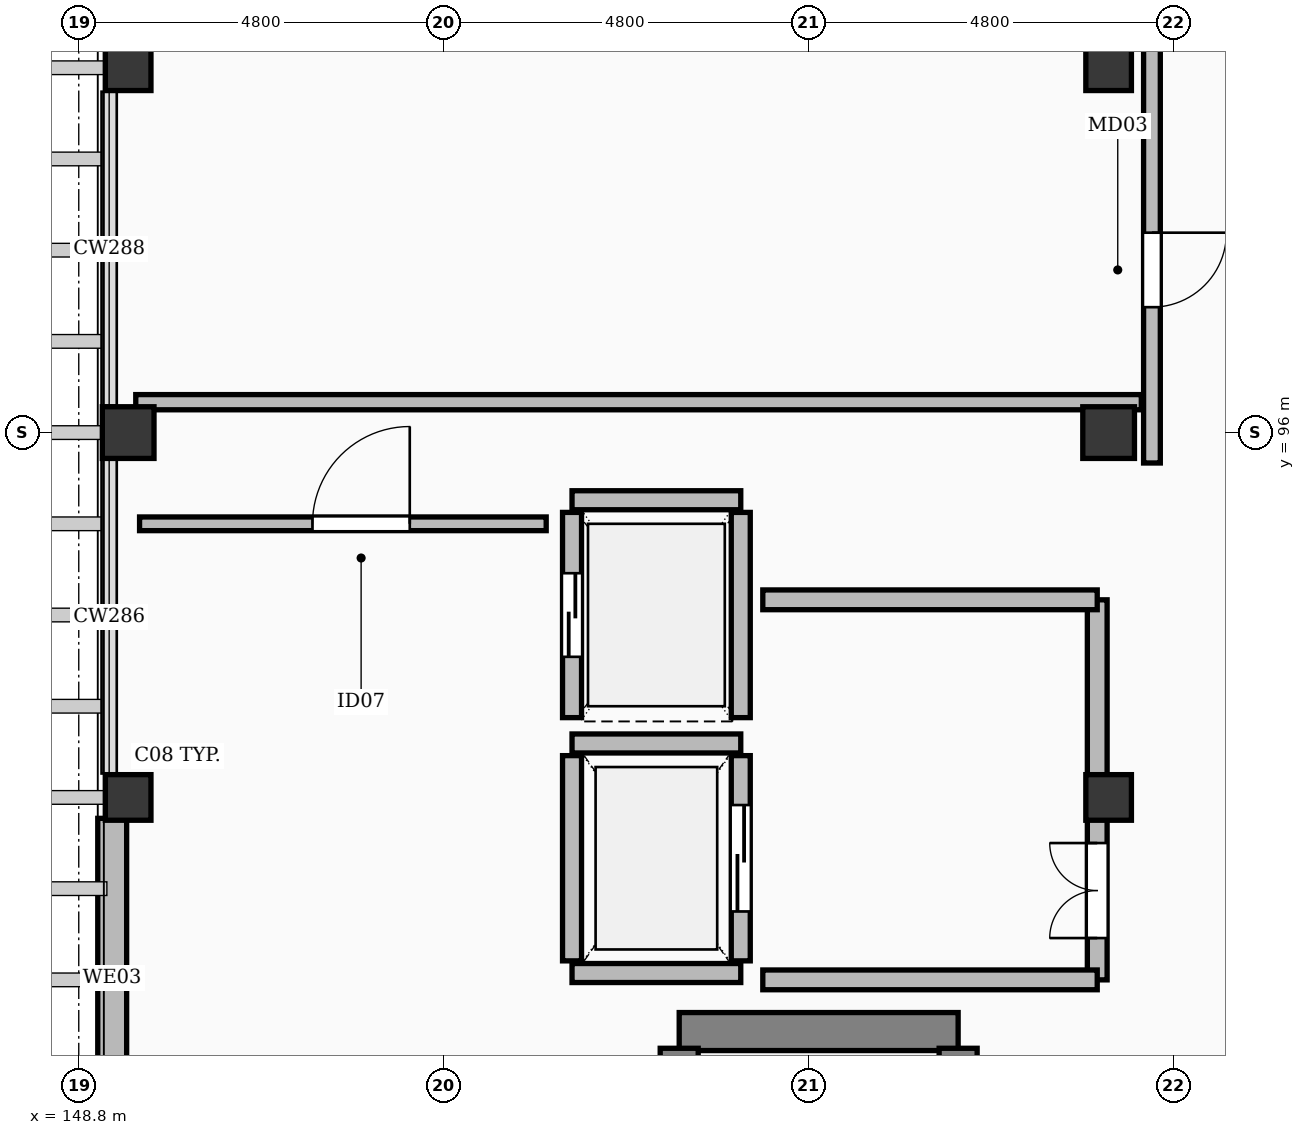
"""IFC4 building model, lengths in metres.
Left out: names, types, materials, properties, quantities, classifications, styles, units other than length and angle.
Written with IfcOpenShell. Run it as: python <this file> out.ifc"""

import sys

from ifc_helpers import new_model, si_unit, direction, frame, frame_2d, origin, origin_2d, place, context, subcontext, project, spatial, rectangle, extrude, element, fill, save


model = new_model("IFC4")
c1 = context("Model", 3, precision=1e-05, world=origin(), true_north=direction((0.0, 1.0)))
c2 = subcontext(c1, "Body", "Model", "MODEL_VIEW")
j1 = project(units=[si_unit("LENGTHUNIT", "METRE"), si_unit("PLANEANGLEUNIT", "RADIAN")], contexts=[c1])
p1 = place(None, origin())
s1 = spatial("IfcSite", under=j1, at=p1, CompositionType="ELEMENT")
p2 = place(p1, origin())
s2 = spatial("IfcBuilding", under=s1, at=p2, CompositionType="ELEMENT")
p3 = place(p2, frame((0.0, 0.0, 35.4)))
s3 = spatial("IfcBuildingStorey", under=s2, at=p3, CompositionType="ELEMENT", Elevation=35.4)
for number, where, z_axis, x_axis in (
    (1, (149.45, 96.0, 0.0), (0.0, 0.0, 1.0), (1.0, 0.0, 0.0)),
    (2, (162.35, 96.0, 0.0), (0.0, 0.0, 1.0), (1.0, 0.0, 0.0)),
):
    element("IfcColumn", number, at=place(p3, frame(where, z_axis=z_axis, x_axis=x_axis)), inside=s3, PredefinedType="COLUMN", context=c2, shape_type="SweptSolid", body=[
        extrude(rectangle(XDim=0.68, YDim=0.68, at=origin_2d()), origin(), (0.0, 0.0, 1.0), 3.6),
    ])
for number, where, z_axis, x_axis in (
    (3, (149.45, 91.2, 0.0), (0.0, 0.0, 1.0), (1.0, 0.0, 0.0)),
    (4, (149.45, 100.8, 0.0), (0.0, 0.0, 1.0), (1.0, 0.0, 0.0)),
    (5, (162.35, 91.2, 0.0), (0.0, 0.0, 1.0), (1.0, 0.0, 0.0)),
    (6, (162.35, 100.8, 0.0), (0.0, 0.0, 1.0), (1.0, 0.0, 0.0)),
):
    element("IfcColumn", number, at=place(p3, frame(where, z_axis=z_axis, x_axis=x_axis)), inside=s3, PredefinedType="COLUMN", context=c2, shape_type="SweptSolid", body=[
        extrude(rectangle(XDim=0.6, YDim=0.6, at=origin_2d()), origin(), (0.0, 0.0, 1.0), 3.6),
    ])
p4 = place(p3, frame((149.24, 86.715, 0.0), z_axis=(0.0, 0.0, 1.0), x_axis=(0.0, 1.0, 0.0)))
e7 = element("IfcWall", 7, at=p4, inside=s3, PredefinedType="SOLIDWALL", context=c2, shape_type="SweptSolid", body=[
    extrude(rectangle(XDim=4.21, YDim=0.38, at=frame_2d((2.105, 0.0))), origin(), (0.0, 0.0, 1.0), 2.732),
])
p5 = place(p3, frame((156.7, 88.12, 0.0), z_axis=(0.0, 0.0, 1.0), x_axis=(1.0, 0.0, 0.0)))
e8 = element("IfcWall", 8, at=p5, inside=s3, PredefinedType="SHEAR", context=c2, shape_type="SweptSolid", body=[
    extrude(rectangle(XDim=3.67, YDim=0.5, at=frame_2d((1.835, 0.0))), origin(), (0.0, 0.0, 1.0), 3.36),
])
p6 = place(p3, frame((156.7, 77.4, 0.0), z_axis=(0.0, 0.0, 1.0), x_axis=(0.0, 1.0, 0.0)))
e9 = element("IfcWall", 9, at=p6, inside=s3, PredefinedType="SHEAR", context=c2, shape_type="SweptSolid", body=[
    extrude(rectangle(XDim=10.5, YDim=0.5, at=frame_2d((5.25, 0.0))), origin(), (0.0, 0.0, 1.0), 3.36),
])
p7 = place(p3, frame((160.37, 77.4, 0.0), z_axis=(0.0, 0.0, 1.0), x_axis=(0.0, 1.0, 0.0)))
e10 = element("IfcWall", 10, at=p7, inside=s3, PredefinedType="SHEAR", context=c2, shape_type="SweptSolid", body=[
    extrude(rectangle(XDim=10.5, YDim=0.5, at=frame_2d((5.25, 0.0))), origin(), (0.0, 0.0, 1.0), 3.36),
])
p8 = place(p7, frame((0.45, 0.0, 0.0)))
e11 = element("IfcOpeningElement", 11, at=p8, cuts=e10, PredefinedType="OPENING", context=c2, shape_type="SweptSolid", body=[
    extrude(rectangle(XDim=1.3, YDim=2.15, at=frame_2d((0.65, 1.075))), frame((0.0, 0.262, 0.0), z_axis=(0.0, -1.0, 0.0), x_axis=(1.0, 0.0, 0.0)), (0.0, 0.0, 1.0), 0.524),
])
for number, where, z_axis, x_axis in (
    (12, (155.29, 88.89, 0.0), (0.0, 0.0, 1.0), (1.0, 0.0, 0.0)),
    (13, (155.29, 91.91, 0.0), (0.0, 0.0, 1.0), (1.0, 0.0, 0.0)),
):
    element("IfcWall", number, at=place(p3, frame(where, z_axis=z_axis, x_axis=x_axis)), inside=s3, PredefinedType="SOLIDWALL", context=c2, shape_type="SweptSolid", body=[
        extrude(rectangle(XDim=2.22, YDim=0.25, at=frame_2d((1.11, 0.0))), origin(), (0.0, 0.0, 1.0), 3.36),
    ])
p9 = place(p3, frame((155.29, 89.05, 0.0), z_axis=(0.0, 0.0, 1.0), x_axis=(0.0, 1.0, 0.0)))
e14 = element("IfcWall", 14, at=p9, inside=s3, PredefinedType="SOLIDWALL", context=c2, shape_type="SweptSolid", body=[
    extrude(rectangle(XDim=2.7, YDim=0.25, at=frame_2d((1.35, 0.0))), origin(), (0.0, 0.0, 1.0), 2.732),
])
p10 = place(p3, frame((157.51, 89.05, 0.0), z_axis=(0.0, 0.0, 1.0), x_axis=(0.0, 1.0, 0.0)))
e15 = element("IfcWall", 15, at=p10, inside=s3, PredefinedType="SOLIDWALL", context=c2, shape_type="SweptSolid", body=[
    extrude(rectangle(XDim=2.7, YDim=0.25, at=frame_2d((1.35, 0.0))), origin(), (0.0, 0.0, 1.0), 2.732),
])
p11 = place(p10, frame((0.65, 0.0, 0.0)))
e16 = element("IfcOpeningElement", 16, at=p11, cuts=e15, PredefinedType="OPENING", context=c2, shape_type="SweptSolid", body=[
    extrude(rectangle(XDim=1.4, YDim=2.3, at=frame_2d((0.7, 1.15))), frame((0.0, 0.137, 0.0), z_axis=(0.0, -1.0, 0.0), x_axis=(1.0, 0.0, 0.0)), (0.0, 0.0, 1.0), 0.274),
])
p12 = place(p3, frame((155.29, 95.11, 0.0), z_axis=(0.0, 0.0, 1.0), x_axis=(1.0, 0.0, 0.0)))
e17 = element("IfcWall", 17, at=p12, inside=s3, PredefinedType="SOLIDWALL", context=c2, shape_type="SweptSolid", body=[
    extrude(rectangle(XDim=2.22, YDim=0.25, at=frame_2d((1.11, 0.0))), origin(), (0.0, 0.0, 1.0), 3.36),
])
p13 = place(p3, frame((155.29, 92.25, 0.0), z_axis=(0.0, 0.0, 1.0), x_axis=(0.0, 1.0, 0.0)))
e18 = element("IfcWall", 18, at=p13, inside=s3, PredefinedType="SOLIDWALL", context=c2, shape_type="SweptSolid", body=[
    extrude(rectangle(XDim=2.7, YDim=0.25, at=frame_2d((1.35, 0.0))), origin(), (0.0, 0.0, 1.0), 3.36),
])
p14 = place(p13, frame((0.8, 0.0, 0.0)))
e19 = element("IfcOpeningElement", 19, at=p14, cuts=e18, PredefinedType="OPENING", context=c2, shape_type="SweptSolid", body=[
    extrude(rectangle(XDim=1.1, YDim=2.2, at=frame_2d((0.55, 1.1))), frame((0.0, 0.137, 0.0), z_axis=(0.0, -1.0, 0.0), x_axis=(1.0, 0.0, 0.0)), (0.0, 0.0, 1.0), 0.274),
])
p15 = place(p3, frame((157.51, 92.25, 0.0), z_axis=(0.0, 0.0, 1.0), x_axis=(0.0, 1.0, 0.0)))
e20 = element("IfcWall", 20, at=p15, inside=s3, PredefinedType="SOLIDWALL", context=c2, shape_type="SweptSolid", body=[
    extrude(rectangle(XDim=2.7, YDim=0.25, at=frame_2d((1.35, 0.0))), origin(), (0.0, 0.0, 1.0), 3.36),
])
p16 = place(p3, frame((162.2, 88.8, 0.0), z_axis=(0.0, 0.0, 1.0), x_axis=(0.0, 1.0, 0.0)))
e21 = element("IfcWall", 21, at=p16, inside=s3, PredefinedType="SOLIDWALL", context=c2, shape_type="SweptSolid", body=[
    extrude(rectangle(XDim=5.0, YDim=0.26, at=frame_2d((2.5, 0.0))), origin(), (0.0, 0.0, 1.0), 2.732),
])
p17 = place(p16, frame((0.55, 0.0, 0.0)))
e22 = element("IfcOpeningElement", 22, at=p17, cuts=e21, PredefinedType="OPENING", context=c2, shape_type="SweptSolid", body=[
    extrude(rectangle(XDim=1.25, YDim=2.15, at=frame_2d((0.625, 1.075))), frame((0.0, 0.142, 0.0), z_axis=(0.0, -1.0, 0.0), x_axis=(1.0, 0.0, 0.0)), (0.0, 0.0, 1.0), 0.284),
])
for number, where, z_axis, x_axis in (
    (23, (157.8, 88.8, 0.0), (0.0, 0.0, 1.0), (1.0, 0.0, 0.0)),
    (24, (157.8, 93.8, 0.0), (0.0, 0.0, 1.0), (1.0, 0.0, 0.0)),
):
    element("IfcWall", number, at=place(p3, frame(where, z_axis=z_axis, x_axis=x_axis)), inside=s3, PredefinedType="SOLIDWALL", context=c2, shape_type="SweptSolid", body=[
        extrude(rectangle(XDim=4.4, YDim=0.26, at=frame_2d((2.2, 0.0))), origin(), (0.0, 0.0, 1.0), 2.732),
    ])
p18 = place(p3, frame((162.92, 95.6, 0.0), z_axis=(0.0, 0.0, 1.0), x_axis=(0.0, 1.0, 0.0)))
e25 = element("IfcWall", 25, at=p18, inside=s3, PredefinedType="PARTITIONING", context=c2, shape_type="SweptSolid", body=[
    extrude(rectangle(XDim=7.22, YDim=0.22, at=frame_2d((3.61, 0.0))), origin(), (0.0, 0.0, 1.0), 2.732),
])
p19 = place(p18, frame((2.05, 0.0, 0.0)))
e26 = element("IfcOpeningElement", 26, at=p19, cuts=e25, PredefinedType="OPENING", context=c2, shape_type="SweptSolid", body=[
    extrude(rectangle(XDim=0.98, YDim=2.15, at=frame_2d((0.49, 1.075))), frame((0.0, 0.122, 0.0), z_axis=(0.0, -1.0, 0.0), x_axis=(1.0, 0.0, 0.0)), (0.0, 0.0, 1.0), 0.244),
])
p20 = place(p18, frame((5.8, 0.0, 0.0)))
e27 = element("IfcOpeningElement", 27, at=p20, cuts=e25, PredefinedType="OPENING", context=c2, shape_type="SweptSolid", body=[
    extrude(rectangle(XDim=1.02, YDim=2.2, at=frame_2d((0.51, 1.1))), frame((0.0, 0.122, 0.0), z_axis=(0.0, -1.0, 0.0), x_axis=(1.0, 0.0, 0.0)), (0.0, 0.0, 1.0), 0.244),
])
p21 = place(p3, frame((149.55, 96.4, 0.0), z_axis=(0.0, 0.0, 1.0), x_axis=(1.0, 0.0, 0.0)))
e28 = element("IfcWall", 28, at=p21, inside=s3, PredefinedType="PARTITIONING", context=c2, shape_type="SweptSolid", body=[
    extrude(rectangle(XDim=13.23, YDim=0.2, at=frame_2d((6.615, 0.0))), origin(), (0.0, 0.0, 1.0), 2.732),
])
p22 = place(p3, frame((149.6, 94.8, 0.0), z_axis=(0.0, 0.0, 1.0), x_axis=(1.0, 0.0, 0.0)))
e29 = element("IfcWall", 29, at=p22, inside=s3, PredefinedType="PARTITIONING", context=c2, shape_type="SweptSolid", body=[
    extrude(rectangle(XDim=5.35, YDim=0.18, at=frame_2d((2.675, 0.0))), origin(), (0.0, 0.0, 1.0), 2.732),
])
p23 = place(p22, frame((2.275, 0.0, 0.0)))
e30 = element("IfcOpeningElement", 30, at=p23, cuts=e29, PredefinedType="OPENING", context=c2, shape_type="SweptSolid", body=[
    extrude(rectangle(XDim=1.28, YDim=2.16, at=frame_2d((0.64, 1.08))), frame((0.0, 0.102, 0.0), z_axis=(0.0, -1.0, 0.0), x_axis=(1.0, 0.0, 0.0)), (0.0, 0.0, 1.0), 0.204),
])
p24 = place(p11, origin())
e31 = element("IfcDoor", 31, at=p24, inside=s3, OperationType="SLIDING_TO_LEFT", PredefinedType="DOOR", context=c2, shape_type="SweptSolid", body=[
    extrude(rectangle(XDim=1.4, YDim=2.3, at=frame_2d((0.7, 1.15))), frame((0.0, 0.025, 0.0), z_axis=(0.0, -1.0, 0.0), x_axis=(1.0, 0.0, 0.0)), (0.0, 0.0, 1.0), 0.05),
])
fill(e16, e31)
p25 = place(p14, origin())
e32 = element("IfcDoor", 32, at=p25, inside=s3, OperationType="SLIDING_TO_LEFT", PredefinedType="DOOR", context=c2, shape_type="SweptSolid", body=[
    extrude(rectangle(XDim=1.1, YDim=2.2, at=frame_2d((0.55, 1.1))), frame((0.0, 0.025, 0.0), z_axis=(0.0, -1.0, 0.0), x_axis=(1.0, 0.0, 0.0)), (0.0, 0.0, 1.0), 0.05),
])
fill(e19, e32)
p26 = place(p17, origin())
e33 = element("IfcDoor", 33, at=p26, inside=s3, OperationType="DOUBLE_DOOR_SINGLE_SWING", PredefinedType="DOOR", context=c2, shape_type="SweptSolid", body=[
    extrude(rectangle(XDim=1.25, YDim=2.15, at=frame_2d((0.625, 1.075))), frame((0.0, 0.025, 0.0), z_axis=(0.0, -1.0, 0.0), x_axis=(1.0, 0.0, 0.0)), (0.0, 0.0, 1.0), 0.05),
])
fill(e22, e33)
p27 = place(p19, frame((0.98, 0.0, 0.0), z_axis=(0.0, 0.0, 1.0), x_axis=(-1.0, 0.0, 0.0)))
e34 = element("IfcDoor", 34, at=p27, inside=s3, OperationType="SINGLE_SWING_RIGHT", PredefinedType="DOOR", context=c2, shape_type="SweptSolid", body=[
    extrude(rectangle(XDim=0.98, YDim=2.15, at=frame_2d((0.49, 1.075))), frame((0.0, 0.025, 0.0), z_axis=(0.0, -1.0, 0.0), x_axis=(1.0, 0.0, 0.0)), (0.0, 0.0, 1.0), 0.05),
])
fill(e26, e34)
p28 = place(p23, origin())
e35 = element("IfcDoor", 35, at=p28, inside=s3, OperationType="SINGLE_SWING_RIGHT", PredefinedType="DOOR", context=c2, shape_type="SweptSolid", body=[
    extrude(rectangle(XDim=1.28, YDim=2.16, at=frame_2d((0.64, 1.08))), frame((0.0, 0.025, 0.0), z_axis=(0.0, -1.0, 0.0), x_axis=(1.0, 0.0, 0.0)), (0.0, 0.0, 1.0), 0.05),
])
fill(e30, e35)
save(model, sys.argv[1])
